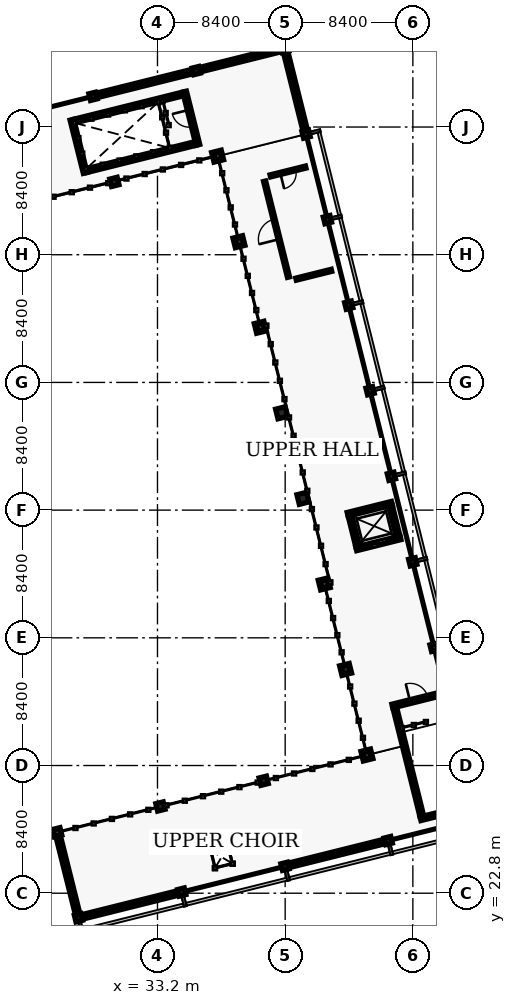
"""IFC4 building model, lengths in metres.
Left out: names, types, materials, properties, quantities, classifications, styles, units other than length and angle.
Written with IfcOpenShell. Run it as: python <this file> out.ifc"""

import sys

from ifc_helpers import new_model, si_unit, direction, frame, frame_2d, origin, origin_2d, place, context, subcontext, project, spatial, rectangle, extrude, element, fill, save


model = new_model("IFC4")
c1 = context("Model", 3, precision=1e-05, world=origin(), true_north=direction((0.0, 1.0)))
c2 = subcontext(c1, "Body", "Model", "MODEL_VIEW")
j1 = project(units=[si_unit("LENGTHUNIT", "METRE"), si_unit("PLANEANGLEUNIT", "RADIAN")], contexts=[c1])
p1 = place(None, origin())
s1 = spatial("IfcSite", under=j1, at=p1, CompositionType="ELEMENT")
p2 = place(p1, origin())
s2 = spatial("IfcBuilding", under=s1, at=p2, CompositionType="ELEMENT")
p3 = place(p2, frame((0.0, 0.0, 9.0)))
s3 = spatial("IfcBuildingStorey", under=s2, at=p3, CompositionType="ELEMENT", Elevation=9.0)
for number, where, z_axis, x_axis in (
    (1, (46.978, 31.891, 0.0), (0.0, 0.0, 1.0), (0.97, 0.242, 0.0)),
    (2, (45.575, 37.518, 0.0), (0.0, 0.0, 1.0), (0.97, 0.242, 0.0)),
    (3, (44.171, 43.146, 0.0), (0.0, 0.0, 1.0), (0.97, 0.242, 0.0)),
    (4, (42.768, 48.774, 0.0), (0.0, 0.0, 1.0), (0.97, 0.242, 0.0)),
    (5, (41.365, 54.402, 0.0), (0.0, 0.0, 1.0), (0.97, 0.242, 0.0)),
    (6, (39.962, 60.029, 0.0), (0.0, 0.0, 1.0), (0.97, 0.242, 0.0)),
    (7, (38.559, 65.657, 0.0), (0.0, 0.0, 1.0), (0.97, 0.242, 0.0)),
    (8, (37.156, 71.285, 0.0), (0.0, 0.0, 1.0), (0.97, 0.242, 0.0)),
):
    element("IfcColumn", number, at=place(p3, frame(where, z_axis=z_axis, x_axis=x_axis)), inside=s3, PredefinedType="COLUMN", context=c2, shape_type="SweptSolid", body=[
        extrude(rectangle(XDim=0.65, YDim=0.65, at=origin_2d()), origin(), (0.0, 0.0, 1.0), 3.9),
    ])
for number, where, z_axis, x_axis in (
    (9, (51.396, 38.97, 0.0), (0.0, 0.0, 1.0), (0.97, 0.242, 0.0)),
    (10, (49.993, 44.598, 0.0), (0.0, 0.0, 1.0), (0.97, 0.242, 0.0)),
    (11, (48.59, 50.225, 0.0), (0.0, 0.0, 1.0), (0.97, 0.242, 0.0)),
    (12, (47.187, 55.853, 0.0), (0.0, 0.0, 1.0), (0.97, 0.242, 0.0)),
    (13, (45.784, 61.481, 0.0), (0.0, 0.0, 1.0), (0.97, 0.242, 0.0)),
    (14, (44.381, 67.108, 0.0), (0.0, 0.0, 1.0), (0.97, 0.242, 0.0)),
    (15, (42.977, 72.736, 0.0), (0.0, 0.0, 1.0), (0.97, 0.242, 0.0)),
    (16, (28.005, 21.183, 0.0), (0.0, 0.0, 1.0), (0.97, 0.242, 0.0)),
    (17, (34.797, 22.876, 0.0), (0.0, 0.0, 1.0), (0.97, 0.242, 0.0)),
    (18, (41.589, 24.569, 0.0), (0.0, 0.0, 1.0), (0.97, 0.242, 0.0)),
    (19, (48.381, 26.263, 0.0), (0.0, 0.0, 1.0), (0.97, 0.242, 0.0)),
):
    element("IfcColumn", number, at=place(p3, frame(where, z_axis=z_axis, x_axis=x_axis)), inside=s3, PredefinedType="COLUMN", context=c2, shape_type="SweptSolid", body=[
        extrude(rectangle(XDim=0.45, YDim=0.45, at=origin_2d()), origin(), (0.0, 0.0, 1.0), 3.9),
    ])
for number, where, z_axis, x_axis in (
    (20, (26.602, 26.81, 0.0), (0.0, 0.0, 1.0), (0.97, 0.242, 0.0)),
    (21, (33.394, 28.504, 0.0), (0.0, 0.0, 1.0), (0.97, 0.242, 0.0)),
    (22, (40.186, 30.197, 0.0), (0.0, 0.0, 1.0), (0.97, 0.242, 0.0)),
    (23, (30.364, 69.591, 0.0), (0.0, 0.0, 1.0), (0.97, 0.242, 0.0)),
):
    element("IfcColumn", number, at=place(p3, frame(where, z_axis=z_axis, x_axis=x_axis)), inside=s3, PredefinedType="COLUMN", context=c2, shape_type="SweptSolid", body=[
        extrude(rectangle(XDim=0.5, YDim=0.5, at=origin_2d()), origin(), (0.0, 0.0, 1.0), 3.9),
    ])
for number, where, z_axis, x_axis in (
    (24, (28.96, 75.219, 0.0), (0.0, 0.0, 1.0), (0.97, 0.242, 0.0)),
    (25, (35.753, 76.912, 0.0), (0.0, 0.0, 1.0), (0.97, 0.242, 0.0)),
    (26, (41.574, 78.364, 0.0), (0.0, 0.0, 1.0), (0.97, 0.242, 0.0)),
):
    element("IfcColumn", number, at=place(p3, frame(where, z_axis=z_axis, x_axis=x_axis)), inside=s3, PredefinedType="COLUMN", context=c2, shape_type="SweptSolid", body=[
        extrude(rectangle(XDim=0.45, YDim=0.45, at=origin_2d()), origin(), (0.0, 0.0, 1.0), 3.9),
    ])
p4 = place(p3, frame((28.102, 21.207, 0.0), z_axis=(0.0, 0.0, 1.0), x_axis=(0.970296478685, 0.241918877831, 0.0)))
e27 = element("IfcWall", 27, at=p4, inside=s3, PredefinedType="SOLIDWALL", context=c2, shape_type="SweptSolid", body=[
    extrude(rectangle(XDim=6.8, YDim=0.3, at=frame_2d((3.4, 0.0))), origin(), (0.0, 0.0, 1.0), 3.135),
])
p5 = place(p4, frame((2.5, 0.0, 0.9)))
e28 = element("IfcOpeningElement", 28, at=p5, cuts=e27, PredefinedType="OPENING", context=c2, shape_type="SweptSolid", body=[
    extrude(rectangle(XDim=1.8, YDim=1.8, at=frame_2d((0.9, 0.9))), frame((0.0, 0.16, 0.0), z_axis=(0.0, -1.0, 0.0), x_axis=(1.0, 0.0, 0.0)), (0.0, 0.0, 1.0), 0.32),
])
p6 = place(p3, frame((41.686, 24.594, 0.0), z_axis=(0.0, 0.0, 1.0), x_axis=(0.970296478685, 0.241918877831, 0.0)))
e29 = element("IfcWall", 29, at=p6, inside=s3, PredefinedType="SOLIDWALL", context=c2, shape_type="SweptSolid", body=[
    extrude(rectangle(XDim=6.8, YDim=0.3, at=frame_2d((3.4, 0.0))), origin(), (0.0, 0.0, 1.0), 3.135),
])
p7 = place(p6, frame((2.5, 0.0, 0.9)))
e30 = element("IfcOpeningElement", 30, at=p7, cuts=e29, PredefinedType="OPENING", context=c2, shape_type="SweptSolid", body=[
    extrude(rectangle(XDim=1.8, YDim=1.8, at=frame_2d((0.9, 0.9))), frame((0.0, 0.16, 0.0), z_axis=(0.0, -1.0, 0.0), x_axis=(1.0, 0.0, 0.0)), (0.0, 0.0, 1.0), 0.32),
])
p8 = place(p3, frame((27.986, 21.261, 0.0), z_axis=(0.0, 0.0, 1.0), x_axis=(-0.242077152267, 0.970257003247, 0.0)))
e31 = element("IfcWall", 31, at=p8, inside=s3, PredefinedType="SOLIDWALL", context=c2, shape_type="SweptSolid", body=[
    extrude(rectangle(XDim=5.639, YDim=0.3, at=frame_2d((2.819, 0.0))), origin(), (0.0, 0.0, 1.0), 3.45),
])
p9 = place(p8, frame((2.07, 0.0, 0.9)))
e32 = element("IfcOpeningElement", 32, at=p9, cuts=e31, PredefinedType="OPENING", context=c2, shape_type="SweptSolid", body=[
    extrude(rectangle(XDim=1.5, YDim=1.5, at=frame_2d((0.75, 0.75))), frame((0.0, 0.16, 0.0), z_axis=(0.0, -1.0, 0.0), x_axis=(1.0, 0.0, 0.0)), (0.0, 0.0, 1.0), 0.32),
])
p10 = place(p3, frame((19.887, 25.136, 0.0), z_axis=(0.0, 0.0, 1.0), x_axis=(0.970287194641, 0.241956111549, 0.0)))
e33 = element("IfcWall", 33, at=p10, inside=s3, PredefinedType="SOLIDWALL", context=c2, shape_type="SweptSolid", body=[
    extrude(rectangle(XDim=6.84, YDim=0.3, at=frame_2d((3.42, 0.0))), origin(), (0.0, 0.0, 1.0), 3.45),
])
p11 = place(p10, frame((2.67, 0.0, 0.9)))
e34 = element("IfcOpeningElement", 34, at=p11, cuts=e33, PredefinedType="OPENING", context=c2, shape_type="SweptSolid", body=[
    extrude(rectangle(XDim=1.5, YDim=1.5, at=frame_2d((0.75, 0.75))), frame((0.0, 0.16, 0.0), z_axis=(0.0, -1.0, 0.0), x_axis=(1.0, 0.0, 0.0)), (0.0, 0.0, 1.0), 0.32),
])
p12 = place(p3, frame((42.958, 72.814, 0.0), z_axis=(0.0, 0.0, 1.0), x_axis=(-0.242036480393, 0.970267149892, 0.0)))
e35 = element("IfcWall", 35, at=p12, inside=s3, PredefinedType="SOLIDWALL", context=c2, shape_type="SweptSolid", body=[
    extrude(rectangle(XDim=5.64, YDim=0.3, at=frame_2d((2.82, 0.0))), origin(), (0.0, 0.0, 1.0), 3.45),
])
p13 = place(p12, frame((2.07, 0.0, 0.9)))
e36 = element("IfcOpeningElement", 36, at=p13, cuts=e35, PredefinedType="OPENING", context=c2, shape_type="SweptSolid", body=[
    extrude(rectangle(XDim=1.5, YDim=1.5, at=frame_2d((0.75, 0.75))), frame((0.0, 0.16, 0.0), z_axis=(0.0, -1.0, 0.0), x_axis=(1.0, 0.0, 0.0)), (0.0, 0.0, 1.0), 0.32),
])
p14 = place(p3, frame((29.058, 75.243, 0.0), z_axis=(0.0, 0.0, 1.0), x_axis=(0.970296478685, 0.241918877831, 0.0)))
e37 = element("IfcWall", 37, at=p14, inside=s3, PredefinedType="SOLIDWALL", context=c2, shape_type="SweptSolid", body=[
    extrude(rectangle(XDim=6.8, YDim=0.3, at=frame_2d((3.4, 0.0))), origin(), (0.0, 0.0, 1.0), 3.135),
])
p15 = place(p14, frame((2.5, 0.0, 0.9)))
e38 = element("IfcOpeningElement", 38, at=p15, cuts=e37, PredefinedType="OPENING", context=c2, shape_type="SweptSolid", body=[
    extrude(rectangle(XDim=1.8, YDim=1.5, at=frame_2d((0.9, 0.75))), frame((0.0, 0.16, 0.0), z_axis=(0.0, -1.0, 0.0), x_axis=(1.0, 0.0, 0.0)), (0.0, 0.0, 1.0), 0.32),
])
p16 = place(p3, frame((35.85, 76.937, 0.0), z_axis=(0.0, 0.0, 1.0), x_axis=(0.97029090175, 0.241941244896, 0.0)))
e39 = element("IfcWall", 39, at=p16, inside=s3, PredefinedType="SOLIDWALL", context=c2, shape_type="SweptSolid", body=[
    extrude(rectangle(XDim=5.799, YDim=0.3, at=frame_2d((2.9, 0.0))), origin(), (0.0, 0.0, 1.0), 3.135),
])
p17 = place(p16, frame((2.0, 0.0, 0.9)))
e40 = element("IfcOpeningElement", 40, at=p17, cuts=e39, PredefinedType="OPENING", context=c2, shape_type="SweptSolid", body=[
    extrude(rectangle(XDim=1.8, YDim=1.5, at=frame_2d((0.9, 0.75))), frame((0.0, 0.16, 0.0), z_axis=(0.0, -1.0, 0.0), x_axis=(1.0, 0.0, 0.0)), (0.0, 0.0, 1.0), 0.32),
])
p18 = place(p3, frame((48.653, 35.112, 0.0), z_axis=(0.0, 0.0, 1.0), x_axis=(0.97025377679, 0.242090083699, 0.0)))
e41 = element("IfcWall", 41, at=p18, inside=s3, PredefinedType="SHEAR", context=c2, shape_type="SweptSolid", body=[
    extrude(rectangle(XDim=3.61, YDim=0.25, at=frame_2d((1.805, 0.0))), origin(), (0.0, 0.0, 1.0), 3.66),
])
p19 = place(p18, frame((1.205, 0.0, 0.0)))
e42 = element("IfcOpeningElement", 42, at=p19, cuts=e41, PredefinedType="OPENING", context=c2, shape_type="SweptSolid", body=[
    extrude(rectangle(XDim=1.2, YDim=2.15, at=frame_2d((0.6, 1.075))), frame((0.0, 0.135, 0.0), z_axis=(0.0, -1.0, 0.0), x_axis=(1.0, 0.0, 0.0)), (0.0, 0.0, 1.0), 0.27),
])
p20 = place(p3, frame((54.004, 28.572, 0.0), z_axis=(0.0, 0.0, 1.0), x_axis=(-0.970301456204, -0.241898912952, 0.0)))
e43 = element("IfcWall", 43, at=p20, inside=s3, PredefinedType="SHEAR", context=c2, shape_type="SweptSolid", body=[
    extrude(rectangle(XDim=3.609, YDim=0.25, at=frame_2d((1.805, 0.0))), origin(), (0.0, 0.0, 1.0), 3.66),
])
p21 = place(p3, frame((50.593, 27.851, 0.0), z_axis=(0.0, 0.0, 1.0), x_axis=(-0.241975869228, 0.970282267544, 0.0)))
e44 = element("IfcWall", 44, at=p21, inside=s3, PredefinedType="SHEAR", context=c2, shape_type="SweptSolid", body=[
    extrude(rectangle(XDim=7.389, YDim=0.25, at=frame_2d((3.695, 0.0))), origin(), (0.0, 0.0, 1.0), 3.66),
])
p22 = place(p3, frame((46.276, 45.454, 0.0), z_axis=(0.0, 0.0, 1.0), x_axis=(0.970276420912, 0.241999312028, 0.0)))
e45 = element("IfcWall", 45, at=p22, inside=s3, PredefinedType="SHEAR", context=c2, shape_type="SweptSolid", body=[
    extrude(rectangle(XDim=2.999, YDim=0.25, at=frame_2d((1.5, 0.0))), origin(), (0.0, 0.0, 1.0), 3.66),
])
p23 = place(p22, frame((0.95, 0.0, 0.0)))
e46 = element("IfcOpeningElement", 46, at=p23, cuts=e45, PredefinedType="OPENING", context=c2, shape_type="SweptSolid", body=[
    extrude(rectangle(XDim=1.1, YDim=2.15, at=frame_2d((0.55, 1.075))), frame((0.0, 0.135, 0.0), z_axis=(0.0, -1.0, 0.0), x_axis=(1.0, 0.0, 0.0)), (0.0, 0.0, 1.0), 0.27),
])
p24 = place(p3, frame((48.62, 48.45, 0.0), z_axis=(0.0, 0.0, 1.0), x_axis=(-0.970276420912, -0.241999312028, 0.0)))
e47 = element("IfcWall", 47, at=p24, inside=s3, PredefinedType="SHEAR", context=c2, shape_type="SweptSolid", body=[
    extrude(rectangle(XDim=2.999, YDim=0.25, at=frame_2d((1.5, 0.0))), origin(), (0.0, 0.0, 1.0), 3.66),
])
p25 = place(p3, frame((49.029, 46.274, 0.0), z_axis=(0.0, 0.0, 1.0), x_axis=(-0.241817773214, 0.970321680969, 0.0)))
e48 = element("IfcWall", 48, at=p25, inside=s3, PredefinedType="SHEAR", context=c2, shape_type="SweptSolid", body=[
    extrude(rectangle(XDim=2.081, YDim=0.25, at=frame_2d((1.041, 0.0))), origin(), (0.0, 0.0, 1.0), 3.66),
])
p26 = place(p3, frame((45.867, 47.63, 0.0), z_axis=(0.0, 0.0, 1.0), x_axis=(0.241845306756, -0.970314818809, 0.0)))
e49 = element("IfcWall", 49, at=p26, inside=s3, PredefinedType="SHEAR", context=c2, shape_type="SweptSolid", body=[
    extrude(rectangle(XDim=2.081, YDim=0.25, at=frame_2d((1.04, 0.0))), origin(), (0.0, 0.0, 1.0), 3.66),
])
p27 = place(p3, frame((34.984, 75.531, 0.0), z_axis=(0.0, 0.0, 1.0), x_axis=(0.242090083699, -0.97025377679, 0.0)))
e50 = element("IfcWall", 50, at=p27, inside=s3, PredefinedType="SHEAR", context=c2, shape_type="SweptSolid", body=[
    extrude(rectangle(XDim=3.61, YDim=0.25, at=frame_2d((1.805, 0.0))), origin(), (0.0, 0.0, 1.0), 3.66),
])
p28 = place(p27, frame((1.235, 0.0, 0.0)))
e51 = element("IfcOpeningElement", 51, at=p28, cuts=e50, PredefinedType="OPENING", context=c2, shape_type="SweptSolid", body=[
    extrude(rectangle(XDim=1.14, YDim=2.15, at=frame_2d((0.57, 1.075))), frame((0.0, 0.135, 0.0), z_axis=(0.0, -1.0, 0.0), x_axis=(1.0, 0.0, 0.0)), (0.0, 0.0, 1.0), 0.27),
])
p29 = place(p3, frame((28.444, 70.18, 0.0), z_axis=(0.0, 0.0, 1.0), x_axis=(-0.241898912952, 0.970301456204, 0.0)))
e52 = element("IfcWall", 52, at=p29, inside=s3, PredefinedType="SHEAR", context=c2, shape_type="SweptSolid", body=[
    extrude(rectangle(XDim=3.609, YDim=0.25, at=frame_2d((1.805, 0.0))), origin(), (0.0, 0.0, 1.0), 3.66),
])
p30 = place(p3, frame((35.706, 72.119, 0.0), z_axis=(0.0, 0.0, 1.0), x_axis=(-0.970299691856, -0.241905989972, 0.0)))
e53 = element("IfcWall", 53, at=p30, inside=s3, PredefinedType="SHEAR", context=c2, shape_type="SweptSolid", body=[
    extrude(rectangle(XDim=7.391, YDim=0.25, at=frame_2d((3.695, 0.0))), origin(), (0.0, 0.0, 1.0), 3.66),
])
p31 = place(p3, frame((27.723, 73.591, 0.0), z_axis=(0.0, 0.0, 1.0), x_axis=(0.970291958031, 0.241937008705, 0.0)))
e54 = element("IfcWall", 54, at=p31, inside=s3, PredefinedType="SHEAR", context=c2, shape_type="SweptSolid", body=[
    extrude(rectangle(XDim=7.39, YDim=0.25, at=frame_2d((3.695, 0.0))), origin(), (0.0, 0.0, 1.0), 3.66),
])
p32 = place(p3, frame((41.819, 63.327, 0.0), z_axis=(0.0, 0.0, 1.0), x_axis=(-0.241881495727, 0.970305798202, 0.0)))
e55 = element("IfcWall", 55, at=p32, inside=s3, PredefinedType="PARTITIONING", context=c2, shape_type="SweptSolid", body=[
    extrude(rectangle(XDim=6.499, YDim=0.14, at=frame_2d((3.25, 0.0))), origin(), (0.0, 0.0, 1.0), 3.645),
])
p33 = place(p32, frame((2.569, 0.0, 0.0)))
e56 = element("IfcOpeningElement", 56, at=p33, cuts=e55, PredefinedType="OPENING", context=c2, shape_type="SweptSolid", body=[
    extrude(rectangle(XDim=1.36, YDim=2.22, at=frame_2d((0.68, 1.11))), frame((0.0, 0.08, 0.0), z_axis=(0.0, -1.0, 0.0), x_axis=(1.0, 0.0, 0.0)), (0.0, 0.0, 1.0), 0.16),
])
p34 = place(p3, frame((42.317, 63.193, 0.0), z_axis=(0.0, 0.0, 1.0), x_axis=(0.970357603284, 0.24167358513, 0.0)))
e57 = element("IfcWall", 57, at=p34, inside=s3, PredefinedType="PARTITIONING", context=c2, shape_type="SweptSolid", body=[
    extrude(rectangle(XDim=2.399, YDim=0.14, at=frame_2d((1.2, 0.0))), origin(), (0.0, 0.0, 1.0), 3.645),
])
p35 = place(p3, frame((40.624, 69.985, 0.0), z_axis=(0.0, 0.0, 1.0), x_axis=(0.970327865017, 0.241792957656, 0.0)))
e58 = element("IfcWall", 58, at=p35, inside=s3, PredefinedType="PARTITIONING", context=c2, shape_type="SweptSolid", body=[
    extrude(rectangle(XDim=2.398, YDim=0.14, at=frame_2d((1.199, 0.0))), origin(), (0.0, 0.0, 1.0), 3.645),
])
p36 = place(p35, frame((0.679, 0.0, 0.0)))
e59 = element("IfcOpeningElement", 59, at=p36, cuts=e58, PredefinedType="OPENING", context=c2, shape_type="SweptSolid", body=[
    extrude(rectangle(XDim=1.04, YDim=2.08, at=frame_2d((0.52, 1.04))), frame((0.0, 0.08, 0.0), z_axis=(0.0, -1.0, 0.0), x_axis=(1.0, 0.0, 0.0)), (0.0, 0.0, 1.0), 0.16),
])
p37 = place(p5, origin())
e60 = element("IfcWindow", 60, at=p37, inside=s3, PartitioningType="SINGLE_PANEL", PredefinedType="WINDOW", context=c2, shape_type="SweptSolid", body=[
    extrude(rectangle(XDim=1.8, YDim=1.8, at=frame_2d((0.9, 0.9))), frame((0.0, 0.03, 0.0), z_axis=(0.0, -1.0, 0.0), x_axis=(1.0, 0.0, 0.0)), (0.0, 0.0, 1.0), 0.06),
])
fill(e28, e60)
p38 = place(p7, origin())
e61 = element("IfcWindow", 61, at=p38, inside=s3, PartitioningType="SINGLE_PANEL", PredefinedType="WINDOW", context=c2, shape_type="SweptSolid", body=[
    extrude(rectangle(XDim=1.8, YDim=1.8, at=frame_2d((0.9, 0.9))), frame((0.0, 0.03, 0.0), z_axis=(0.0, -1.0, 0.0), x_axis=(1.0, 0.0, 0.0)), (0.0, 0.0, 1.0), 0.06),
])
fill(e30, e61)
p39 = place(p9, origin())
e62 = element("IfcWindow", 62, at=p39, inside=s3, PartitioningType="SINGLE_PANEL", PredefinedType="WINDOW", context=c2, shape_type="SweptSolid", body=[
    extrude(rectangle(XDim=1.5, YDim=1.5, at=frame_2d((0.75, 0.75))), frame((0.0, 0.03, 0.0), z_axis=(0.0, -1.0, 0.0), x_axis=(1.0, 0.0, 0.0)), (0.0, 0.0, 1.0), 0.06),
])
fill(e32, e62)
p40 = place(p13, origin())
e63 = element("IfcWindow", 63, at=p40, inside=s3, PartitioningType="SINGLE_PANEL", PredefinedType="WINDOW", context=c2, shape_type="SweptSolid", body=[
    extrude(rectangle(XDim=1.5, YDim=1.5, at=frame_2d((0.75, 0.75))), frame((0.0, 0.03, 0.0), z_axis=(0.0, -1.0, 0.0), x_axis=(1.0, 0.0, 0.0)), (0.0, 0.0, 1.0), 0.06),
])
fill(e36, e63)
p41 = place(p15, origin())
e64 = element("IfcWindow", 64, at=p41, inside=s3, PartitioningType="SINGLE_PANEL", PredefinedType="WINDOW", context=c2, shape_type="SweptSolid", body=[
    extrude(rectangle(XDim=1.8, YDim=1.5, at=frame_2d((0.9, 0.75))), frame((0.0, 0.03, 0.0), z_axis=(0.0, -1.0, 0.0), x_axis=(1.0, 0.0, 0.0)), (0.0, 0.0, 1.0), 0.06),
])
fill(e38, e64)
p42 = place(p17, origin())
e65 = element("IfcWindow", 65, at=p42, inside=s3, PartitioningType="SINGLE_PANEL", PredefinedType="WINDOW", context=c2, shape_type="SweptSolid", body=[
    extrude(rectangle(XDim=1.8, YDim=1.5, at=frame_2d((0.9, 0.75))), frame((0.0, 0.03, 0.0), z_axis=(0.0, -1.0, 0.0), x_axis=(1.0, 0.0, 0.0)), (0.0, 0.0, 1.0), 0.06),
])
fill(e40, e65)
p43 = place(p19, origin())
e66 = element("IfcDoor", 66, at=p43, inside=s3, OperationType="SINGLE_SWING_LEFT", PredefinedType="DOOR", context=c2, shape_type="SweptSolid", body=[
    extrude(rectangle(XDim=1.2, YDim=2.15, at=frame_2d((0.6, 1.075))), frame((0.0, 0.025, 0.0), z_axis=(0.0, -1.0, 0.0), x_axis=(1.0, 0.0, 0.0)), (0.0, 0.0, 1.0), 0.05),
])
fill(e42, e66)
p44 = place(p23, origin())
e67 = element("IfcDoor", 67, at=p44, inside=s3, OperationType="SLIDING_TO_LEFT", PredefinedType="DOOR", context=c2, shape_type="SweptSolid", body=[
    extrude(rectangle(XDim=1.1, YDim=2.15, at=frame_2d((0.55, 1.075))), frame((0.0, 0.025, 0.0), z_axis=(0.0, -1.0, 0.0), x_axis=(1.0, 0.0, 0.0)), (0.0, 0.0, 1.0), 0.05),
])
fill(e46, e67)
p45 = place(p28, origin())
e68 = element("IfcDoor", 68, at=p45, inside=s3, OperationType="SINGLE_SWING_RIGHT", PredefinedType="DOOR", context=c2, shape_type="SweptSolid", body=[
    extrude(rectangle(XDim=1.14, YDim=2.15, at=frame_2d((0.57, 1.075))), frame((0.0, 0.025, 0.0), z_axis=(0.0, -1.0, 0.0), x_axis=(1.0, 0.0, 0.0)), (0.0, 0.0, 1.0), 0.05),
])
fill(e51, e68)
p46 = place(p33, origin())
e69 = element("IfcDoor", 69, at=p46, inside=s3, OperationType="DOUBLE_DOOR_SINGLE_SWING", PredefinedType="DOOR", context=c2, shape_type="SweptSolid", body=[
    extrude(rectangle(XDim=1.36, YDim=2.22, at=frame_2d((0.68, 1.11))), frame((0.0, 0.025, 0.0), z_axis=(0.0, -1.0, 0.0), x_axis=(1.0, 0.0, 0.0)), (0.0, 0.0, 1.0), 0.05),
])
fill(e56, e69)
p47 = place(p36, origin())
e70 = element("IfcDoor", 70, at=p47, inside=s3, OperationType="SINGLE_SWING_RIGHT", PredefinedType="DOOR", context=c2, shape_type="SweptSolid", body=[
    extrude(rectangle(XDim=1.04, YDim=2.08, at=frame_2d((0.52, 1.04))), frame((0.0, 0.025, 0.0), z_axis=(0.0, -1.0, 0.0), x_axis=(1.0, 0.0, 0.0)), (0.0, 0.0, 1.0), 0.05),
])
fill(e59, e70)
save(model, sys.argv[1])
